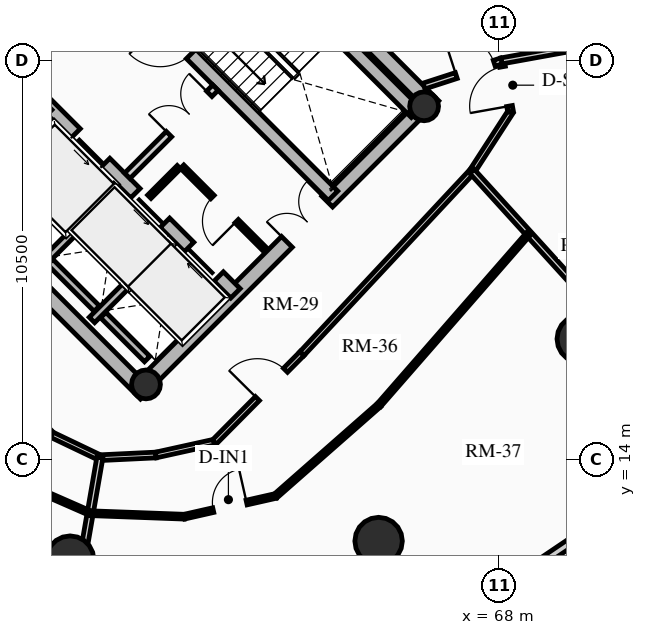
"""IFC4 building model, lengths in metres.
Left out: names, types, materials, properties, quantities, classifications, styles, units other than length and angle.
Written with IfcOpenShell. Run it as: python <this file> out.ifc"""

import sys

from ifc_helpers import new_model, si_unit, direction, frame, frame_2d, origin, origin_2d, place, context, subcontext, project, spatial, rectangle, circle, hollow_circle, extrude, source, transform, mapped, element, fill, save


model = new_model("IFC4")
c1 = context("Model", 3, precision=1e-05, world=origin(), true_north=direction((0.0, 1.0)))
c2 = subcontext(c1, "Body", "Model", "MODEL_VIEW")
j1 = project(units=[si_unit("LENGTHUNIT", "METRE"), si_unit("PLANEANGLEUNIT", "RADIAN")], contexts=[c1])
p1 = place(None, origin())
s1 = spatial("IfcSite", under=j1, at=p1, CompositionType="ELEMENT")
p2 = place(p1, origin())
s2 = spatial("IfcBuilding", under=s1, at=p2, CompositionType="ELEMENT")
p3 = place(p2, frame((0.0, 0.0, 163.24)))
s3 = spatial("IfcBuildingStorey", under=s2, at=p3, CompositionType="ELEMENT", Elevation=163.24)
for number, where, z_axis, x_axis in (
    (1, (58.702, 15.732, 0.0), (0.0, 0.0, 1.0), (-0.707, 0.707, 0.0)),
    (2, (66.268, 23.298, 0.0), (0.0, 0.0, 1.0), (-0.707, 0.707, 0.0)),
):
    element("IfcWall", number, at=place(p3, frame(where, z_axis=z_axis, x_axis=x_axis)), inside=s3, PredefinedType="SHEAR", context=c2, shape_type="SweptSolid", body=[
        extrude(rectangle(XDim=14.1, YDim=0.4, at=frame_2d((7.05, 0.0))), origin(), (0.0, 0.0, 1.0), 2.91),
    ])
p4 = place(p3, frame((58.561, 15.873, 0.0), z_axis=(0.0, 0.0, 1.0), x_axis=(0.707106781187, 0.707106781187, 0.0)))
e3 = element("IfcWall", 3, at=p4, inside=s3, PredefinedType="SHEAR", context=c2, shape_type="SweptSolid", body=[
    extrude(rectangle(XDim=10.7, YDim=0.4, at=frame_2d((5.35, 0.0))), origin(), (0.0, 0.0, 1.0), 2.91),
])
m1 = source(origin(), c2, "Body", "SweptSolid", [
    extrude(rectangle(XDim=1.5, YDim=2.02, at=frame_2d((0.75, 1.01))), frame((0.0, 0.21, 0.0), z_axis=(0.0, -1.0, 0.0), x_axis=(1.0, 0.0, 0.0)), (0.0, 0.0, 1.0), 0.42),
])
p5 = place(p4, frame((5.45, 0.0, 0.0)))
e4 = element("IfcOpeningElement", 4, at=p5, cuts=e3, PredefinedType="OPENING", context=c2, shape_type="MappedRepresentation", body=[
    mapped(m1, transform((0.0, 0.0, 0.0), x_axis=(1.0, 0.0, 0.0), y_axis=(0.0, 1.0, 0.0), z_axis=(0.0, 0.0, 1.0), scale=1.0)),
])
p6 = place(p3, frame((61.06, 18.373, 0.0), z_axis=(0.0, 0.0, 1.0), x_axis=(-0.707106781187, 0.707106781187, 0.0)))
e5 = element("IfcWall", 5, at=p6, inside=s3, PredefinedType="SHEAR", context=c2, shape_type="SweptSolid", body=[
    extrude(rectangle(XDim=13.7, YDim=0.35, at=frame_2d((6.85, 0.0))), origin(), (0.0, 0.0, 1.0), 2.91),
])
m2 = source(origin(), c2, "Body", "SweptSolid", [
    extrude(rectangle(XDim=1.1, YDim=2.015, at=frame_2d((0.55, 1.007))), frame((0.0, 0.185, 0.0), z_axis=(0.0, -1.0, 0.0), x_axis=(1.0, 0.0, 0.0)), (0.0, 0.0, 1.0), 0.37),
])
p7 = place(p6, frame((4.85, 0.0, 0.0)))
e6 = element("IfcOpeningElement", 6, at=p7, cuts=e5, PredefinedType="OPENING", context=c2, shape_type="MappedRepresentation", body=[
    mapped(m2, transform((0.0, 0.0, 0.0), x_axis=(1.0, 0.0, 0.0), y_axis=(0.0, 1.0, 0.0), z_axis=(0.0, 0.0, 1.0), scale=1.0)),
])
p8 = place(p6, frame((0.625, 0.0, 0.0)))
e7 = element("IfcOpeningElement", 7, at=p8, cuts=e5, PredefinedType="OPENING", context=c2, shape_type="MappedRepresentation", body=[
    mapped(m2, transform((0.0, 0.0, 0.0), x_axis=(1.0, 0.0, 0.0), y_axis=(0.0, 1.0, 0.0), z_axis=(0.0, 0.0, 1.0), scale=1.0)),
])
p9 = place(p6, frame((2.625, 0.0, 0.0)))
e8 = element("IfcOpeningElement", 8, at=p9, cuts=e5, PredefinedType="OPENING", context=c2, shape_type="MappedRepresentation", body=[
    mapped(m2, transform((0.0, 0.0, 0.0), x_axis=(1.0, 0.0, 0.0), y_axis=(0.0, 1.0, 0.0), z_axis=(0.0, 0.0, 1.0), scale=1.0)),
])
m3 = source(origin(), c2, "Body", "SweptSolid", [
    extrude(rectangle(XDim=1.15, YDim=2.02, at=frame_2d((0.575, 1.01))), frame((0.0, 0.185, 0.0), z_axis=(0.0, -1.0, 0.0), x_axis=(1.0, 0.0, 0.0)), (0.0, 0.0, 1.0), 0.37),
])
p10 = place(p6, frame((7.27, 0.0, 0.0)))
e9 = element("IfcOpeningElement", 9, at=p10, cuts=e5, PredefinedType="OPENING", context=c2, shape_type="MappedRepresentation", body=[
    mapped(m3, transform((0.0, 0.0, 0.0), x_axis=(1.0, 0.0, 0.0), y_axis=(0.0, 1.0, 0.0), z_axis=(0.0, 0.0, 1.0), scale=1.0)),
])
p11 = place(p3, frame((63.627, 20.94, 0.0), z_axis=(0.0, 0.0, 1.0), x_axis=(-0.707119496762, 0.707094065383, 0.0)))
e10 = element("IfcWall", 10, at=p11, inside=s3, PredefinedType="SHEAR", context=c2, shape_type="SweptSolid", body=[
    extrude(rectangle(XDim=9.6, YDim=0.35, at=frame_2d((4.8, 0.0))), origin(), (0.0, 0.0, 1.0), 2.91),
])
p12 = place(p11, frame((5.28, 0.0, 0.0)))
e11 = element("IfcOpeningElement", 11, at=p12, cuts=e10, PredefinedType="OPENING", context=c2, shape_type="MappedRepresentation", body=[
    mapped(m3, transform((0.0, 0.0, 0.0), x_axis=(1.0, 0.0, 0.0), y_axis=(0.0, 1.0, 0.0), z_axis=(0.0, 0.0, 1.0), scale=1.0)),
])
p13 = place(p3, frame((65.812, 23.125, 0.0), z_axis=(0.0, 0.0, 1.0), x_axis=(-0.707106781187, 0.707106781187, 0.0)))
e12 = element("IfcWall", 12, at=p13, inside=s3, PredefinedType="SHEAR", context=c2, shape_type="SweptSolid", body=[
    extrude(rectangle(XDim=6.695, YDim=0.35, at=frame_2d((3.348, 0.0))), origin(), (0.0, 0.0, 1.0), 2.91),
])
for number, where, z_axis, x_axis in (
    (13, (58.706, 15.976, 0.0), (0.0, 0.0, 1.0), (0.707, 0.707, 0.0)),
    (14, (66.024, 23.294, 0.0), (0.0, 0.0, 1.0), (0.707, 0.707, 0.0)),
):
    element("IfcColumn", number, at=place(p3, frame(where, z_axis=z_axis, x_axis=x_axis)), inside=s3, PredefinedType="COLUMN", context=c2, shape_type="SweptSolid", body=[
        extrude(hollow_circle(Radius=0.38, WallThickness=0.032, at=origin_2d()), origin(), (0.0, 0.0, 1.0), 2.91),
    ])
for number, where, z_axis, x_axis in (
    (15, (56.709, 11.365, 0.0), (0.0, 0.0, 1.0), (1.0, 0.0, 0.0)),
    (16, (64.827, 11.854, 0.0), (0.0, 0.0, 1.0), (1.0, 0.0, 0.0)),
    (17, (70.146, 17.173, 0.0), (0.0, 0.0, 1.0), (1.0, 0.0, 0.0)),
):
    element("IfcColumn", number, at=place(p3, frame(where, z_axis=z_axis, x_axis=x_axis)), inside=s3, PredefinedType="USERDEFINED", context=c2, shape_type="SweptSolid", body=[
        extrude(circle(Radius=0.625, at=origin_2d()), origin(), (0.0, 0.0, 1.0), 2.91),
    ])
p14 = place(p3, frame((70.065, 11.935, 0.0), z_axis=(0.0, 0.0, 1.0), x_axis=(-0.828739009952, -0.559635286042, 0.0)))
e18 = element("IfcWall", 18, at=p14, inside=s3, PredefinedType="SOLIDWALL", context=c2, shape_type="SweptSolid", body=[
    extrude(rectangle(XDim=4.569, YDim=0.22, at=frame_2d((2.284, 0.0))), origin(), (0.0, 0.0, 1.0), 2.245),
])
p15 = place(p3, frame((55.888, 19.069, 0.0), z_axis=(0.0, 0.0, 1.0), x_axis=(0.707106781187, 0.707106781187, 0.0)))
e19 = element("IfcWall", 19, at=p15, inside=s3, PredefinedType="SHEAR", context=c2, shape_type="SweptSolid", body=[
    extrude(rectangle(XDim=2.97, YDim=0.2, at=frame_2d((1.485, 0.0))), origin(), (0.0, 0.0, 1.0), 2.91),
])
p16 = place(p3, frame((57.284, 17.673, 0.0), z_axis=(0.0, 0.0, 1.0), x_axis=(0.707147878904, 0.70706568108, 0.0)))
e20 = element("IfcWall", 20, at=p16, inside=s3, PredefinedType="SHEAR", context=c2, shape_type="SweptSolid", body=[
    extrude(rectangle(XDim=2.97, YDim=0.2, at=frame_2d((1.485, 0.0))), origin(), (0.0, 0.0, 1.0), 2.91),
])
p17 = place(p3, frame((57.412, 17.97, 0.0), z_axis=(0.0, 0.0, 1.0), x_axis=(-0.707106781187, 0.707106781187, 0.0)))
e21 = element("IfcWall", 21, at=p17, inside=s3, PredefinedType="SHEAR", context=c2, shape_type="SweptSolid", body=[
    extrude(rectangle(XDim=1.735, YDim=0.2, at=frame_2d((0.867, 0.0))), origin(), (0.0, 0.0, 1.0), 2.91),
])
p18 = place(p3, frame((58.737, 16.644, 0.0), z_axis=(0.0, 0.0, 1.0), x_axis=(-0.707032117043, 0.707181437447, 0.0)))
e22 = element("IfcWall", 22, at=p18, inside=s3, PredefinedType="SHEAR", context=c2, shape_type="SweptSolid", body=[
    extrude(rectangle(XDim=1.635, YDim=0.2, at=frame_2d((0.817, 0.0))), origin(), (0.0, 0.0, 1.0), 2.91),
])
p19 = place(p3, frame((58.214, 21.467, 0.0), z_axis=(0.0, 0.0, 1.0), x_axis=(0.707106781187, 0.707106781187, 0.0)))
e23 = element("IfcWall", 23, at=p19, inside=s3, PredefinedType="PARTITIONING", context=c2, shape_type="SweptSolid", body=[
    extrude(rectangle(XDim=3.28, YDim=0.2, at=frame_2d((1.64, 0.0))), origin(), (0.0, 0.0, 1.0), 2.675),
])
m4 = source(origin(), c2, "Body", "SweptSolid", [
    extrude(rectangle(XDim=1.5, YDim=2.02, at=frame_2d((0.75, 1.01))), frame((0.0, 0.11, 0.0), z_axis=(0.0, -1.0, 0.0), x_axis=(1.0, 0.0, 0.0)), (0.0, 0.0, 1.0), 0.22),
])
p20 = place(p19, frame((1.55, 0.0, 0.0)))
e24 = element("IfcOpeningElement", 24, at=p20, cuts=e23, PredefinedType="OPENING", context=c2, shape_type="MappedRepresentation", body=[
    mapped(m4, transform((0.0, 0.0, 0.0), x_axis=(1.0, 0.0, 0.0), y_axis=(0.0, 1.0, 0.0), z_axis=(0.0, 0.0, 1.0), scale=1.0)),
])
p21 = place(p3, frame((54.961, 24.719, 0.0), z_axis=(0.0, 0.0, 1.0), x_axis=(0.707106781187, 0.707106781187, 0.0)))
e25 = element("IfcWall", 25, at=p21, inside=s3, PredefinedType="PARTITIONING", context=c2, shape_type="SweptSolid", body=[
    extrude(rectangle(XDim=3.28, YDim=0.2, at=frame_2d((1.64, 0.0))), origin(), (0.0, 0.0, 1.0), 2.675),
])
m5 = source(origin(), c2, "Body", "SweptSolid", [
    extrude(rectangle(XDim=0.9, YDim=2.005, at=frame_2d((0.45, 1.002))), frame((0.0, 0.11, 0.0), z_axis=(0.0, -1.0, 0.0), x_axis=(1.0, 0.0, 0.0)), (0.0, 0.0, 1.0), 0.22),
])
p22 = place(p21, frame((0.16, 0.0, 0.0)))
e26 = element("IfcOpeningElement", 26, at=p22, cuts=e25, PredefinedType="OPENING", context=c2, shape_type="MappedRepresentation", body=[
    mapped(m5, transform((0.0, 0.0, 0.0), x_axis=(1.0, 0.0, 0.0), y_axis=(0.0, 1.0, 0.0), z_axis=(0.0, 0.0, 1.0), scale=1.0)),
])
p23 = place(p3, frame((61.835, 19.529, 0.0), z_axis=(0.0, 0.0, 1.0), x_axis=(-0.707146413884, 0.707067146267, 0.0)))
e27 = element("IfcWall", 27, at=p23, inside=s3, PredefinedType="PARTITIONING", context=c2, shape_type="SweptSolid", body=[
    extrude(rectangle(XDim=3.08, YDim=0.125, at=frame_2d((1.54, 0.0))), origin(), (0.0, 0.0, 1.0), 2.675),
])
m6 = source(origin(), c2, "Body", "SweptSolid", [
    extrude(rectangle(XDim=0.9, YDim=2.005, at=frame_2d((0.45, 1.002))), frame((0.0, 0.073, 0.0), z_axis=(0.0, -1.0, 0.0), x_axis=(1.0, 0.0, 0.0)), (0.0, 0.0, 1.0), 0.145),
])
p24 = place(p23, frame((1.05, 0.0, 0.0)))
e28 = element("IfcOpeningElement", 28, at=p24, cuts=e27, PredefinedType="OPENING", context=c2, shape_type="MappedRepresentation", body=[
    mapped(m6, transform((0.0, 0.0, 0.0), x_axis=(1.0, 0.0, 0.0), y_axis=(0.0, 1.0, 0.0), z_axis=(0.0, 0.0, 1.0), scale=1.0)),
])
p25 = place(p3, frame((58.794, 20.915, 0.0), z_axis=(0.0, 0.0, 1.0), x_axis=(0.707106781187, 0.707106781187, 0.0)))
e29 = element("IfcWall", 29, at=p25, inside=s3, PredefinedType="PARTITIONING", context=c2, shape_type="SweptSolid", body=[
    extrude(rectangle(XDim=1.1, YDim=0.125, at=frame_2d((0.55, 0.0))), origin(), (0.0, 0.0, 1.0), 2.675),
])
p26 = place(p3, frame((51.985, 18.985, 0.0), z_axis=(0.0, 0.0, 1.0), x_axis=(0.699619654291, -0.714515457726, 0.0)))
e30 = element("IfcWall", 30, at=p26, inside=s3, PredefinedType="PARTITIONING", context=c2, shape_type="SweptSolid", body=[
    extrude(rectangle(XDim=6.064, YDim=0.15, at=frame_2d((3.032, 0.0))), origin(), (0.0, 0.0, 1.0), 2.245),
])
m7 = source(origin(), c2, "Body", "SweptSolid", [
    extrude(rectangle(XDim=1.05, YDim=2.015, at=frame_2d((0.525, 1.007))), frame((0.0, 0.085, 0.0), z_axis=(0.0, -1.0, 0.0), x_axis=(1.0, 0.0, 0.0)), (0.0, 0.0, 1.0), 0.17),
])
p27 = place(p26, frame((2.507, 0.0, 0.0)))
e31 = element("IfcOpeningElement", 31, at=p27, cuts=e30, PredefinedType="OPENING", context=c2, shape_type="MappedRepresentation", body=[
    mapped(m7, transform((0.0, 0.0, 0.0), x_axis=(1.0, 0.0, 0.0), y_axis=(0.0, 1.0, 0.0), z_axis=(0.0, 0.0, 1.0), scale=1.0)),
])
p28 = place(p3, frame((56.227, 14.652, 0.0), z_axis=(0.0, 0.0, 1.0), x_axis=(0.902364039563, -0.430974639745, 0.0)))
e32 = element("IfcWall", 32, at=p28, inside=s3, PredefinedType="PARTITIONING", context=c2, shape_type="SweptSolid", body=[
    extrude(rectangle(XDim=1.401, YDim=0.15, at=frame_2d((0.701, 0.0))), origin(), (0.0, 0.0, 1.0), 2.245),
])
p29 = place(p3, frame((57.492, 14.048, 0.0), z_axis=(0.0, 0.0, 1.0), x_axis=(0.99885011351, 0.047942160364, 0.0)))
e33 = element("IfcWall", 33, at=p29, inside=s3, PredefinedType="PARTITIONING", context=c2, shape_type="SweptSolid", body=[
    extrude(rectangle(XDim=1.477, YDim=0.15, at=frame_2d((0.738, 0.0))), origin(), (0.0, 0.0, 1.0), 2.245),
])
p30 = place(p3, frame((58.967, 14.118, 0.0), z_axis=(0.0, 0.0, 1.0), x_axis=(0.976471358036, 0.215647135235, 0.0)))
e34 = element("IfcWall", 34, at=p30, inside=s3, PredefinedType="PARTITIONING", context=c2, shape_type="SweptSolid", body=[
    extrude(rectangle(XDim=1.571, YDim=0.15, at=frame_2d((0.786, 0.0))), origin(), (0.0, 0.0, 1.0), 2.245),
])
p31 = place(p3, frame((60.501, 14.457, 0.0), z_axis=(0.0, 0.0, 1.0), x_axis=(0.704012266258, 0.710187812454, 0.0)))
e35 = element("IfcWall", 35, at=p31, inside=s3, PredefinedType="PARTITIONING", context=c2, shape_type="SweptSolid", body=[
    extrude(rectangle(XDim=3.281, YDim=0.15, at=frame_2d((1.641, 0.0))), origin(), (0.0, 0.0, 1.0), 2.245),
])
p32 = place(p31, frame((1.614, 0.0, 0.0)))
e36 = element("IfcOpeningElement", 36, at=p32, cuts=e35, PredefinedType="OPENING", context=c2, shape_type="MappedRepresentation", body=[
    mapped(m7, transform((0.0, 0.0, 0.0), x_axis=(1.0, 0.0, 0.0), y_axis=(0.0, 1.0, 0.0), z_axis=(0.0, 0.0, 1.0), scale=1.0)),
])
p33 = place(p3, frame((62.812, 16.788, 0.0), z_axis=(0.0, 0.0, 1.0), x_axis=(0.682323555485, 0.731050316757, 0.0)))
e37 = element("IfcWall", 37, at=p33, inside=s3, PredefinedType="PARTITIONING", context=c2, shape_type="SweptSolid", body=[
    extrude(rectangle(XDim=6.559, YDim=0.15, at=frame_2d((3.279, 0.0))), origin(), (0.0, 0.0, 1.0), 2.245),
])
p34 = place(p3, frame((67.287, 21.582, 0.0), z_axis=(0.0, 0.0, 1.0), x_axis=(0.543202443884, 0.839601753785, 0.0)))
e38 = element("IfcWall", 38, at=p34, inside=s3, PredefinedType="PARTITIONING", context=c2, shape_type="SweptSolid", body=[
    extrude(rectangle(XDim=1.866, YDim=0.15, at=frame_2d((0.933, 0.0))), origin(), (0.0, 0.0, 1.0), 2.245),
])
p35 = place(p3, frame((68.3, 23.149, 0.0), z_axis=(0.0, 0.0, 1.0), x_axis=(-0.176423554694, 0.984314344785, 0.0)))
e39 = element("IfcWall", 39, at=p35, inside=s3, PredefinedType="PARTITIONING", context=c2, shape_type="SweptSolid", body=[
    extrude(rectangle(XDim=1.362, YDim=0.15, at=frame_2d((0.681, 0.0))), origin(), (0.0, 0.0, 1.0), 2.245),
])
p36 = place(p35, frame((0.156, 0.0, 0.0)))
e40 = element("IfcOpeningElement", 40, at=p36, cuts=e39, PredefinedType="OPENING", context=c2, shape_type="MappedRepresentation", body=[
    mapped(m7, transform((0.0, 0.0, 0.0), x_axis=(1.0, 0.0, 0.0), y_axis=(0.0, 1.0, 0.0), z_axis=(0.0, 0.0, 1.0), scale=1.0)),
])
p37 = place(p3, frame((57.492, 14.048, 0.0), z_axis=(0.0, 0.0, 1.0), x_axis=(-0.171191349619, -0.985237799628, 0.0)))
e41 = element("IfcWall", 41, at=p37, inside=s3, PredefinedType="PARTITIONING", context=c2, shape_type="SweptSolid", body=[
    extrude(rectangle(XDim=5.295, YDim=0.16, at=frame_2d((2.647, 0.0))), origin(), (0.0, 0.0, 1.0), 2.245),
])
p38 = place(p3, frame((67.287, 21.582, 0.0), z_axis=(0.0, 0.0, 1.0), x_axis=(0.672520632772, -0.740078373212, 0.0)))
e42 = element("IfcWall", 42, at=p38, inside=s3, PredefinedType="PARTITIONING", context=c2, shape_type="SweptSolid", body=[
    extrude(rectangle(XDim=7.907, YDim=0.16, at=frame_2d((3.954, 0.0))), origin(), (0.0, 0.0, 1.0), 2.245),
])
p39 = place(p3, frame((68.06, 24.489, 0.0), z_axis=(0.0, 0.0, 1.0), x_axis=(0.983987798657, 0.178235832802, 0.0)))
e43 = element("IfcWall", 43, at=p39, inside=s3, PredefinedType="PARTITIONING", context=c2, shape_type="SweptSolid", body=[
    extrude(rectangle(XDim=5.193, YDim=0.16, at=frame_2d((2.596, 0.0))), origin(), (0.0, 0.0, 1.0), 2.245),
])
p40 = place(p3, frame((66.021, 23.828, 0.0), z_axis=(0.0, 0.0, 1.0), x_axis=(0.951292345965, 0.308290240695, 0.0)))
e44 = element("IfcWall", 44, at=p40, inside=s3, PredefinedType="PARTITIONING", context=c2, shape_type="SweptSolid", body=[
    extrude(rectangle(XDim=2.144, YDim=0.16, at=frame_2d((1.072, 0.0))), origin(), (0.0, 0.0, 1.0), 2.245),
])
m8 = source(origin(), c2, "Body", "SweptSolid", [
    extrude(rectangle(XDim=1.05, YDim=2.015, at=frame_2d((0.525, 1.007))), frame((0.0, 0.09, 0.0), z_axis=(0.0, -1.0, 0.0), x_axis=(1.0, 0.0, 0.0)), (0.0, 0.0, 1.0), 0.18),
])
p41 = place(p40, frame((0.894, 0.0, 0.0)))
e45 = element("IfcOpeningElement", 45, at=p41, cuts=e44, PredefinedType="OPENING", context=c2, shape_type="MappedRepresentation", body=[
    mapped(m8, transform((0.0, 0.0, 0.0), x_axis=(1.0, 0.0, 0.0), y_axis=(0.0, 1.0, 0.0), z_axis=(0.0, 0.0, 1.0), scale=1.0)),
])
p42 = place(p3, frame((54.94, 13.594, 0.0), z_axis=(0.0, 0.0, 1.0), x_axis=(0.915898070967, -0.401410916143, 0.0)))
e46 = element("IfcWall", 46, at=p42, inside=s3, PredefinedType="PARTITIONING", context=c2, shape_type="SweptSolid", body=[
    extrude(rectangle(XDim=2.509, YDim=0.125, at=frame_2d((1.254, 0.0))), origin(), (0.0, 0.0, 1.0), 2.245),
])
p43 = place(p3, frame((57.238, 12.587, 0.0), z_axis=(0.0, 0.0, 1.0), x_axis=(0.999316318576, -0.036971548882, 0.0)))
e47 = element("IfcWall", 47, at=p43, inside=s3, PredefinedType="PARTITIONING", context=c2, shape_type="SweptSolid", body=[
    extrude(rectangle(XDim=2.476, YDim=0.125, at=frame_2d((1.238, 0.0))), origin(), (0.0, 0.0, 1.0), 2.245),
])
p44 = place(p3, frame((59.713, 12.495, 0.0), z_axis=(0.0, 0.0, 1.0), x_axis=(0.975260144608, 0.221060286662, 0.0)))
e48 = element("IfcWall", 48, at=p44, inside=s3, PredefinedType="PARTITIONING", context=c2, shape_type="SweptSolid", body=[
    extrude(rectangle(XDim=2.465, YDim=0.125, at=frame_2d((1.232, 0.0))), origin(), (0.0, 0.0, 1.0), 2.245),
])
p45 = place(p44, frame((0.782, 0.0, 0.0)))
e49 = element("IfcOpeningElement", 49, at=p45, cuts=e48, PredefinedType="OPENING", context=c2, shape_type="MappedRepresentation", body=[
    mapped(m6, transform((0.0, 0.0, 0.0), x_axis=(1.0, 0.0, 0.0), y_axis=(0.0, 1.0, 0.0), z_axis=(0.0, 0.0, 1.0), scale=1.0)),
])
p46 = place(p3, frame((62.117, 13.04, 0.0), z_axis=(0.0, 0.0, 1.0), x_axis=(0.751084924077, 0.660205601933, 0.0)))
e50 = element("IfcWall", 50, at=p46, inside=s3, PredefinedType="PARTITIONING", context=c2, shape_type="SweptSolid", body=[
    extrude(rectangle(XDim=3.624, YDim=0.125, at=frame_2d((1.812, 0.0))), origin(), (0.0, 0.0, 1.0), 2.245),
])
p47 = place(p3, frame((64.839, 15.433, 0.0), z_axis=(0.0, 0.0, 1.0), x_axis=(0.657505208165, 0.753449999161, 0.0)))
e51 = element("IfcWall", 51, at=p47, inside=s3, PredefinedType="PARTITIONING", context=c2, shape_type="SweptSolid", body=[
    extrude(rectangle(XDim=5.988, YDim=0.125, at=frame_2d((2.994, 0.0))), origin(), (0.0, 0.0, 1.0), 2.245),
])
m9 = source(origin(), c2, "Body", "SweptSolid", [
    extrude(rectangle(XDim=1.1, YDim=2.015, at=frame_2d((0.55, 1.007))), frame((0.0, 0.025, 0.0), z_axis=(0.0, -1.0, 0.0), x_axis=(1.0, 0.0, 0.0)), (0.0, 0.0, 1.0), 0.05),
])
p48 = place(p7, origin())
e52 = element("IfcDoor", 52, at=p48, inside=s3, OperationType="SLIDING_TO_LEFT", PredefinedType="DOOR", context=c2, shape_type="MappedRepresentation", body=[
    mapped(m9, transform((0.0, 0.0, 0.0), x_axis=(1.0, 0.0, 0.0), y_axis=(0.0, 1.0, 0.0), z_axis=(0.0, 0.0, 1.0), scale=1.0)),
])
fill(e6, e52)
p49 = place(p8, origin())
e53 = element("IfcDoor", 53, at=p49, inside=s3, OperationType="SLIDING_TO_RIGHT", PredefinedType="DOOR", context=c2, shape_type="MappedRepresentation", body=[
    mapped(m9, transform((0.0, 0.0, 0.0), x_axis=(1.0, 0.0, 0.0), y_axis=(0.0, 1.0, 0.0), z_axis=(0.0, 0.0, 1.0), scale=1.0)),
])
fill(e7, e53)
p50 = place(p9, origin())
e54 = element("IfcDoor", 54, at=p50, inside=s3, OperationType="SLIDING_TO_LEFT", PredefinedType="DOOR", context=c2, shape_type="MappedRepresentation", body=[
    mapped(m9, transform((0.0, 0.0, 0.0), x_axis=(1.0, 0.0, 0.0), y_axis=(0.0, 1.0, 0.0), z_axis=(0.0, 0.0, 1.0), scale=1.0)),
])
fill(e8, e54)
m10 = source(origin(), c2, "Body", "SweptSolid", [
    extrude(rectangle(XDim=1.15, YDim=2.02, at=frame_2d((0.575, 1.01))), frame((0.0, 0.025, 0.0), z_axis=(0.0, -1.0, 0.0), x_axis=(1.0, 0.0, 0.0)), (0.0, 0.0, 1.0), 0.05),
])
p51 = place(p12, origin())
e55 = element("IfcDoor", 55, at=p51, inside=s3, OperationType="SINGLE_SWING_RIGHT", PredefinedType="DOOR", context=c2, shape_type="MappedRepresentation", body=[
    mapped(m10, transform((0.0, 0.0, 0.0), x_axis=(1.0, 0.0, 0.0), y_axis=(0.0, 1.0, 0.0), z_axis=(0.0, 0.0, 1.0), scale=1.0)),
])
fill(e11, e55)
m11 = source(origin(), c2, "Body", "SweptSolid", [
    extrude(rectangle(XDim=1.5, YDim=2.02, at=frame_2d((0.75, 1.01))), frame((0.0, 0.025, 0.0), z_axis=(0.0, -1.0, 0.0), x_axis=(1.0, 0.0, 0.0)), (0.0, 0.0, 1.0), 0.05),
])
p52 = place(p5, origin())
e56 = element("IfcDoor", 56, at=p52, inside=s3, OperationType="DOUBLE_DOOR_SINGLE_SWING", PredefinedType="DOOR", context=c2, shape_type="MappedRepresentation", body=[
    mapped(m11, transform((0.0, 0.0, 0.0), x_axis=(1.0, 0.0, 0.0), y_axis=(0.0, 1.0, 0.0), z_axis=(0.0, 0.0, 1.0), scale=1.0)),
])
fill(e4, e56)
p53 = place(p20, origin())
e57 = element("IfcDoor", 57, at=p53, inside=s3, OperationType="DOUBLE_DOOR_SINGLE_SWING", PredefinedType="DOOR", context=c2, shape_type="MappedRepresentation", body=[
    mapped(m11, transform((0.0, 0.0, 0.0), x_axis=(1.0, 0.0, 0.0), y_axis=(0.0, 1.0, 0.0), z_axis=(0.0, 0.0, 1.0), scale=1.0)),
])
fill(e24, e57)
m12 = source(origin(), c2, "Body", "SweptSolid", [
    extrude(rectangle(XDim=0.9, YDim=2.005, at=frame_2d((0.45, 1.002))), frame((0.0, 0.025, 0.0), z_axis=(0.0, -1.0, 0.0), x_axis=(1.0, 0.0, 0.0)), (0.0, 0.0, 1.0), 0.05),
])
p54 = place(p24, origin())
e58 = element("IfcDoor", 58, at=p54, inside=s3, OperationType="SINGLE_SWING_LEFT", PredefinedType="DOOR", context=c2, shape_type="MappedRepresentation", body=[
    mapped(m12, transform((0.0, 0.0, 0.0), x_axis=(1.0, 0.0, 0.0), y_axis=(0.0, 1.0, 0.0), z_axis=(0.0, 0.0, 1.0), scale=1.0)),
])
fill(e28, e58)
m13 = source(origin(), c2, "Body", "SweptSolid", [
    extrude(rectangle(XDim=1.05, YDim=2.015, at=frame_2d((0.525, 1.007))), frame((0.0, 0.025, 0.0), z_axis=(0.0, -1.0, 0.0), x_axis=(1.0, 0.0, 0.0)), (0.0, 0.0, 1.0), 0.05),
])
p55 = place(p41, origin())
e59 = element("IfcDoor", 59, at=p55, inside=s3, OperationType="SINGLE_SWING_LEFT", PredefinedType="DOOR", context=c2, shape_type="MappedRepresentation", body=[
    mapped(m13, transform((0.0, 0.0, 0.0), x_axis=(1.0, 0.0, 0.0), y_axis=(0.0, 1.0, 0.0), z_axis=(0.0, 0.0, 1.0), scale=1.0)),
])
fill(e45, e59)
p56 = place(p32, origin())
e60 = element("IfcDoor", 60, at=p56, inside=s3, OperationType="SINGLE_SWING_LEFT", PredefinedType="DOOR", context=c2, shape_type="MappedRepresentation", body=[
    mapped(m13, transform((0.0, 0.0, 0.0), x_axis=(1.0, 0.0, 0.0), y_axis=(0.0, 1.0, 0.0), z_axis=(0.0, 0.0, 1.0), scale=1.0)),
])
fill(e36, e60)
p57 = place(p45, origin())
e61 = element("IfcDoor", 61, at=p57, inside=s3, OperationType="SINGLE_SWING_RIGHT", PredefinedType="DOOR", context=c2, shape_type="MappedRepresentation", body=[
    mapped(m12, transform((0.0, 0.0, 0.0), x_axis=(1.0, 0.0, 0.0), y_axis=(0.0, 1.0, 0.0), z_axis=(0.0, 0.0, 1.0), scale=1.0)),
])
fill(e49, e61)
p58 = place(p36, origin())
e62 = element("IfcDoor", 62, at=p58, inside=s3, OperationType="SINGLE_SWING_LEFT", PredefinedType="DOOR", context=c2, shape_type="MappedRepresentation", body=[
    mapped(m13, transform((0.0, 0.0, 0.0), x_axis=(1.0, 0.0, 0.0), y_axis=(0.0, 1.0, 0.0), z_axis=(0.0, 0.0, 1.0), scale=1.0)),
])
fill(e40, e62)
save(model, sys.argv[1])
